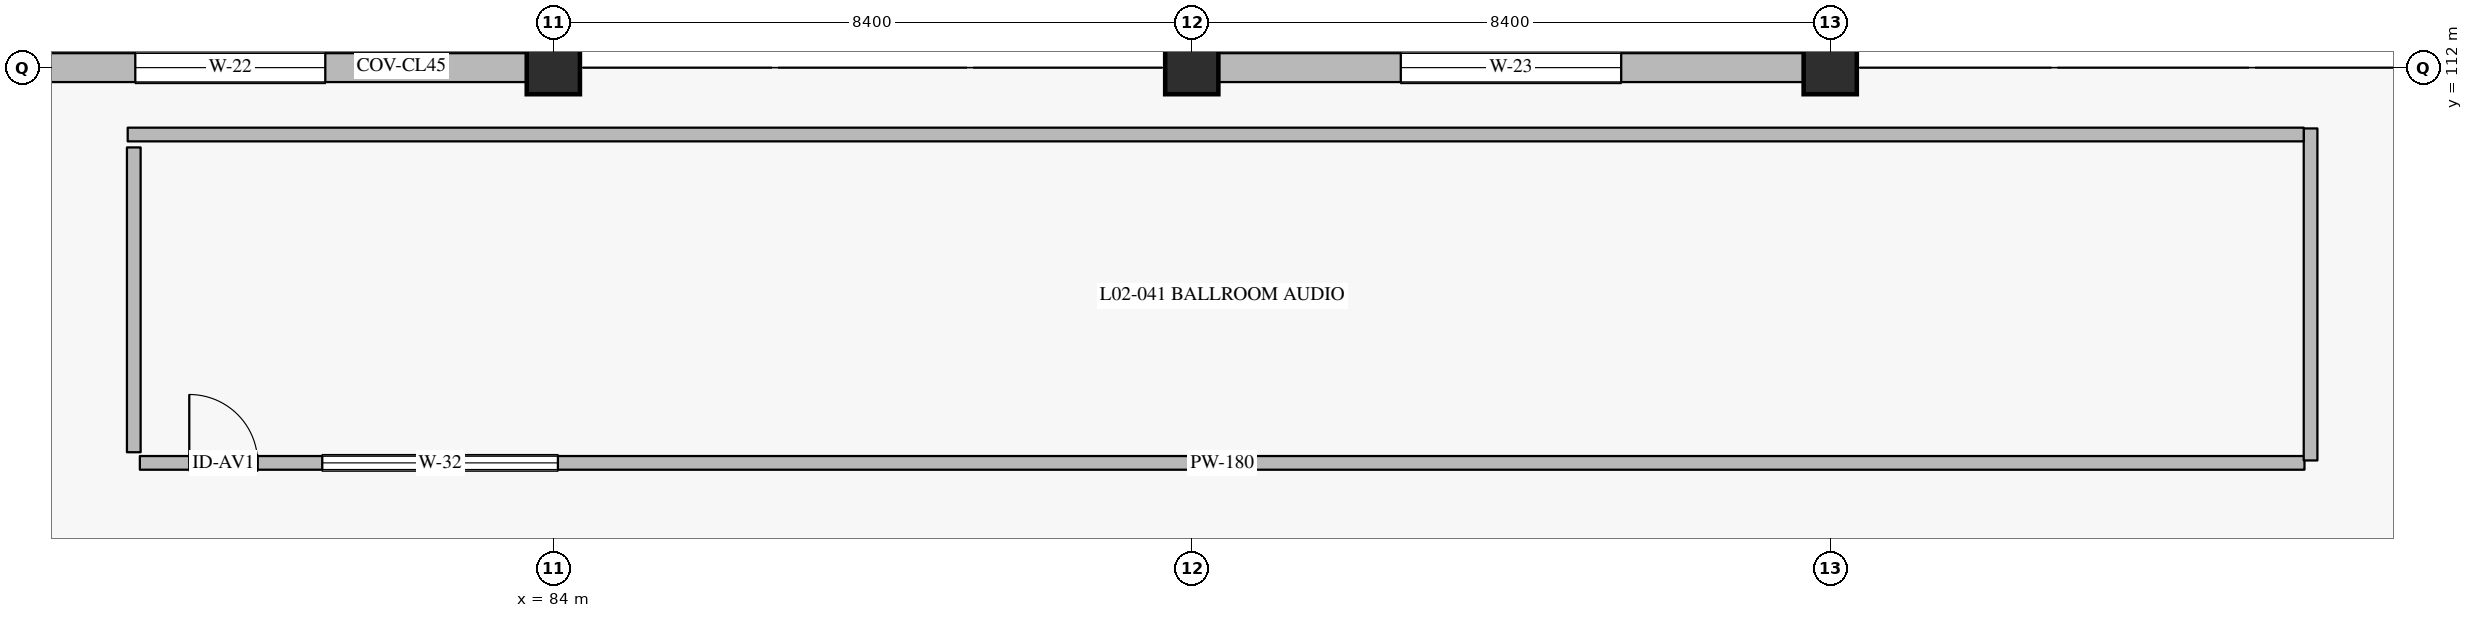
"""IFC4 building model, lengths in metres.
Left out: names, types, materials, properties, quantities, classifications, styles, units other than length and angle.
Written with IfcOpenShell. Run it as: python <this file> out.ifc"""

import sys

from ifc_helpers import new_model, si_unit, direction, frame, frame_2d, origin, origin_2d, place, context, subcontext, project, spatial, rectangle, extrude, element, fill, save


model = new_model("IFC4")
c1 = context("Model", 3, precision=1e-05, world=origin(), true_north=direction((0.0, 1.0)))
c2 = subcontext(c1, "Body", "Model", "MODEL_VIEW")
j1 = project(units=[si_unit("LENGTHUNIT", "METRE"), si_unit("PLANEANGLEUNIT", "RADIAN")], contexts=[c1])
p1 = place(None, origin())
s1 = spatial("IfcSite", under=j1, at=p1, CompositionType="ELEMENT")
p2 = place(p1, origin())
s2 = spatial("IfcBuilding", under=s1, at=p2, CompositionType="ELEMENT")
p3 = place(p2, frame((0.0, 0.0, 11.4)))
s3 = spatial("IfcBuildingStorey", under=s2, at=p3, CompositionType="ELEMENT", Elevation=11.4)
for number, where, z_axis, x_axis in (
    (1, (84.0, 112.0, 0.0), (0.0, 0.0, 1.0), (1.0, 0.0, 0.0)),
    (2, (92.4, 112.0, 0.0), (0.0, 0.0, 1.0), (1.0, 0.0, 0.0)),
    (3, (100.8, 112.0, 0.0), (0.0, 0.0, 1.0), (1.0, 0.0, 0.0)),
):
    element("IfcColumn", number, at=place(p3, frame(where, z_axis=z_axis, x_axis=x_axis)), inside=s3, PredefinedType="COLUMN", context=c2, shape_type="SweptSolid", body=[
        extrude(rectangle(XDim=0.7, YDim=0.7, at=origin_2d()), origin(), (0.0, 0.0, 1.0), 4.8),
    ])
p4 = place(p3, frame((75.85, 112.0, 0.0), z_axis=(0.0, 0.0, 1.0), x_axis=(1.0, 0.0, 0.0)))
e4 = element("IfcWall", 4, at=p4, inside=s3, PredefinedType="SOLIDWALL", context=c2, shape_type="SweptSolid", body=[
    extrude(rectangle(XDim=7.8, YDim=0.38, at=frame_2d((3.9, 0.0))), origin(), (0.0, 0.0, 1.0), 3.9),
])
p5 = place(p4, frame((2.65, 0.0, 1.05)))
e5 = element("IfcOpeningElement", 5, at=p5, cuts=e4, PredefinedType="OPENING", context=c2, shape_type="SweptSolid", body=[
    extrude(rectangle(XDim=2.5, YDim=1.65, at=frame_2d((1.25, 0.825))), frame((0.0, 0.2, 0.0), z_axis=(0.0, -1.0, 0.0), x_axis=(1.0, 0.0, 0.0)), (0.0, 0.0, 1.0), 0.4),
])
p6 = place(p3, frame((92.75, 112.0, 0.0), z_axis=(0.0, 0.0, 1.0), x_axis=(1.0, 0.0, 0.0)))
e6 = element("IfcWall", 6, at=p6, inside=s3, PredefinedType="SOLIDWALL", context=c2, shape_type="SweptSolid", body=[
    extrude(rectangle(XDim=7.7, YDim=0.38, at=frame_2d((3.85, 0.0))), origin(), (0.0, 0.0, 1.0), 3.9),
])
p7 = place(p6, frame((2.4, 0.0, 1.05)))
e7 = element("IfcOpeningElement", 7, at=p7, cuts=e6, PredefinedType="OPENING", context=c2, shape_type="SweptSolid", body=[
    extrude(rectangle(XDim=2.9, YDim=1.75, at=frame_2d((1.45, 0.875))), frame((0.0, 0.2, 0.0), z_axis=(0.0, -1.0, 0.0), x_axis=(1.0, 0.0, 0.0)), (0.0, 0.0, 1.0), 0.4),
])
p8 = place(p3, frame((78.56, 106.8, 0.0), z_axis=(0.0, 0.0, 1.0), x_axis=(1.0, 0.0, 0.0)))
e8 = element("IfcWall", 8, at=p8, inside=s3, PredefinedType="PARTITIONING", context=c2, shape_type="SweptSolid", body=[
    extrude(rectangle(XDim=28.48, YDim=0.18, at=frame_2d((14.24, 0.0))), origin(), (0.0, 0.0, 1.0), 4.535),
])
p9 = place(p8, frame((0.65, 0.0, 0.0)))
e9 = element("IfcOpeningElement", 9, at=p9, cuts=e8, PredefinedType="OPENING", context=c2, shape_type="SweptSolid", body=[
    extrude(rectangle(XDim=0.9, YDim=2.1, at=frame_2d((0.45, 1.05))), frame((0.0, 0.1, 0.0), z_axis=(0.0, -1.0, 0.0), x_axis=(1.0, 0.0, 0.0)), (0.0, 0.0, 1.0), 0.2),
])
p10 = place(p8, frame((2.4, 0.0, 0.9)))
e10 = element("IfcOpeningElement", 10, at=p10, cuts=e8, PredefinedType="OPENING", context=c2, shape_type="SweptSolid", body=[
    extrude(rectangle(XDim=3.1, YDim=1.3, at=frame_2d((1.55, 0.65))), frame((0.0, 0.1, 0.0), z_axis=(0.0, -1.0, 0.0), x_axis=(1.0, 0.0, 0.0)), (0.0, 0.0, 1.0), 0.2),
])
p11 = place(p3, frame((78.48, 106.94, 0.0), z_axis=(0.0, 0.0, 1.0), x_axis=(0.0, 1.0, 0.0)))
e11 = element("IfcWall", 11, at=p11, inside=s3, PredefinedType="PARTITIONING", context=c2, shape_type="SweptSolid", body=[
    extrude(rectangle(XDim=4.01, YDim=0.18, at=frame_2d((2.005, 0.0))), origin(), (0.0, 0.0, 1.0), 4.535),
])
p12 = place(p3, frame((107.12, 106.832, 0.0), z_axis=(0.0, 0.0, 1.0), x_axis=(0.0, 1.0, 0.0)))
e12 = element("IfcWall", 12, at=p12, inside=s3, PredefinedType="PARTITIONING", context=c2, shape_type="SweptSolid", body=[
    extrude(rectangle(XDim=4.368, YDim=0.18, at=frame_2d((2.184, 0.0))), origin(), (0.0, 0.0, 1.0), 4.535),
])
p13 = place(p3, frame((78.4, 111.12, 0.0), z_axis=(0.0, 0.0, 1.0), x_axis=(1.0, 0.0, 0.0)))
e13 = element("IfcWall", 13, at=p13, inside=s3, PredefinedType="PARTITIONING", context=c2, shape_type="SweptSolid", body=[
    extrude(rectangle(XDim=28.63, YDim=0.18, at=frame_2d((14.315, 0.0))), origin(), (0.0, 0.0, 1.0), 4.535),
])
p14 = place(p5, origin())
e14 = element("IfcWindow", 14, at=p14, inside=s3, PartitioningType="DOUBLE_PANEL_VERTICAL", PredefinedType="WINDOW", context=c2, shape_type="SweptSolid", body=[
    extrude(rectangle(XDim=2.5, YDim=1.65, at=frame_2d((1.25, 0.825))), frame((0.0, 0.03, 0.0), z_axis=(0.0, -1.0, 0.0), x_axis=(1.0, 0.0, 0.0)), (0.0, 0.0, 1.0), 0.06),
])
fill(e5, e14)
p15 = place(p7, origin())
e15 = element("IfcWindow", 15, at=p15, inside=s3, PartitioningType="DOUBLE_PANEL_VERTICAL", PredefinedType="WINDOW", context=c2, shape_type="SweptSolid", body=[
    extrude(rectangle(XDim=2.9, YDim=1.75, at=frame_2d((1.45, 0.875))), frame((0.0, 0.03, 0.0), z_axis=(0.0, -1.0, 0.0), x_axis=(1.0, 0.0, 0.0)), (0.0, 0.0, 1.0), 0.06),
])
fill(e7, e15)
p16 = place(p9, origin())
e16 = element("IfcDoor", 16, at=p16, inside=s3, OperationType="SINGLE_SWING_LEFT", PredefinedType="DOOR", context=c2, shape_type="SweptSolid", body=[
    extrude(rectangle(XDim=0.9, YDim=2.1, at=frame_2d((0.45, 1.05))), frame((0.0, 0.025, 0.0), z_axis=(0.0, -1.0, 0.0), x_axis=(1.0, 0.0, 0.0)), (0.0, 0.0, 1.0), 0.05),
])
fill(e9, e16)
p17 = place(p10, origin())
e17 = element("IfcWindow", 17, at=p17, inside=s3, PartitioningType="DOUBLE_PANEL_VERTICAL", PredefinedType="WINDOW", context=c2, shape_type="SweptSolid", body=[
    extrude(rectangle(XDim=3.1, YDim=1.3, at=frame_2d((1.55, 0.65))), frame((0.0, 0.03, 0.0), z_axis=(0.0, -1.0, 0.0), x_axis=(1.0, 0.0, 0.0)), (0.0, 0.0, 1.0), 0.06),
])
fill(e10, e17)
save(model, sys.argv[1])
